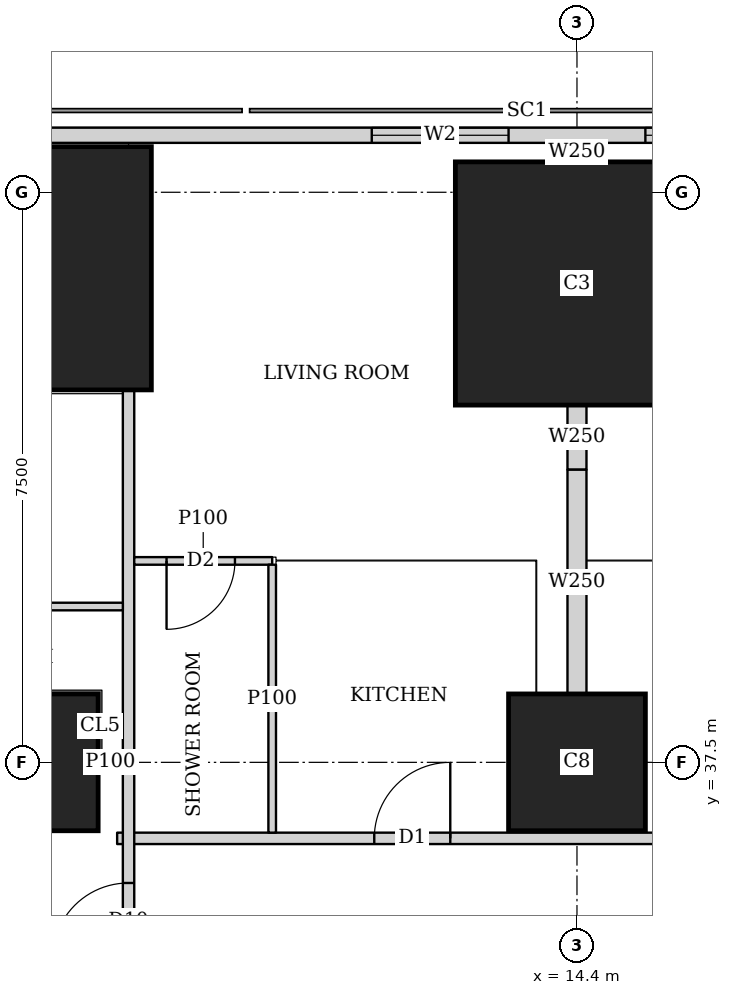
"""IFC4 building model, lengths in metres.
Left out: names, types, materials, properties, quantities, classifications, styles, units other than length and angle.
Written with IfcOpenShell. Run it as: python <this file> out.ifc"""

import sys

from ifc_helpers import new_model, si_unit, direction, frame, frame_2d, origin, origin_2d, place, context, subcontext, project, spatial, rectangle, extrude, element, fill, save


model = new_model("IFC4")
c1 = context("Model", 3, precision=1e-05, world=origin(), true_north=direction((0.0, 1.0)))
c2 = subcontext(c1, "Body", "Model", "MODEL_VIEW")
j1 = project(units=[si_unit("LENGTHUNIT", "METRE"), si_unit("PLANEANGLEUNIT", "RADIAN")], contexts=[c1])
p1 = place(None, origin())
s1 = spatial("IfcSite", under=j1, at=p1, CompositionType="ELEMENT")
p2 = place(p1, origin())
s2 = spatial("IfcBuilding", under=s1, at=p2, CompositionType="ELEMENT")
p3 = place(p2, frame((0.0, 0.0, 23.75)))
s3 = spatial("IfcBuildingStorey", under=s2, at=p3, CompositionType="ELEMENT", Elevation=23.75)
for number, where, z_axis, x_axis in (
    (1, (7.2, 37.5, 0.0), (0.0, 0.0, 1.0), (1.0, 0.0, 0.0)),
    (2, (14.4, 37.5, 0.0), (0.0, 0.0, 1.0), (1.0, 0.0, 0.0)),
):
    element("IfcColumn", number, at=place(p3, frame(where, z_axis=z_axis, x_axis=x_axis)), inside=s3, PredefinedType="COLUMN", context=c2, shape_type="SweptSolid", body=[
        extrude(rectangle(XDim=1.8, YDim=1.8, at=origin_2d()), origin(), (0.0, 0.0, 1.0), 3.75),
    ])
for number, where, z_axis, x_axis in (
    (3, (7.2, 44.0, 0.0), (0.0, 0.0, 1.0), (1.0, 0.0, 0.0)),
    (4, (14.4, 43.8, 0.0), (0.0, 0.0, 1.0), (1.0, 0.0, 0.0)),
):
    element("IfcColumn", number, at=place(p3, frame(where, z_axis=z_axis, x_axis=x_axis)), inside=s3, PredefinedType="COLUMN", context=c2, shape_type="SweptSolid", body=[
        extrude(rectangle(XDim=3.2, YDim=3.2, at=origin_2d()), origin(), (0.0, 0.0, 1.0), 3.75),
    ])
p4 = place(p3, frame((40.106, 45.75, 0.0), z_axis=(0.0, 0.0, 1.0), x_axis=(-1.0, 0.0, 0.0)))
e5 = element("IfcWall", 5, at=p4, inside=s3, PredefinedType="SOLIDWALL", context=c2, shape_type="SweptSolid", body=[
    extrude(rectangle(XDim=37.943, YDim=0.2, at=frame_2d((18.971, 0.0))), origin(), (0.0, 0.0, 1.0), 3.5),
])
p5 = place(p4, frame((8.606, 0.0, 0.9)))
e6 = element("IfcOpeningElement", 6, at=p5, cuts=e5, PredefinedType="OPENING", context=c2, shape_type="SweptSolid", body=[
    extrude(rectangle(XDim=1.8, YDim=1.5, at=frame_2d((0.9, 0.75))), frame((0.0, 0.11, 0.0), z_axis=(0.0, -1.0, 0.0), x_axis=(1.0, 0.0, 0.0)), (0.0, 0.0, 1.0), 0.22),
])
p6 = place(p4, frame((12.206, 0.0, 0.9)))
e7 = element("IfcOpeningElement", 7, at=p6, cuts=e5, PredefinedType="OPENING", context=c2, shape_type="SweptSolid", body=[
    extrude(rectangle(XDim=1.8, YDim=1.5, at=frame_2d((0.9, 0.75))), frame((0.0, 0.11, 0.0), z_axis=(0.0, -1.0, 0.0), x_axis=(1.0, 0.0, 0.0)), (0.0, 0.0, 1.0), 0.22),
])
p7 = place(p4, frame((15.806, 0.0, 0.9)))
e8 = element("IfcOpeningElement", 8, at=p7, cuts=e5, PredefinedType="OPENING", context=c2, shape_type="SweptSolid", body=[
    extrude(rectangle(XDim=1.8, YDim=1.5, at=frame_2d((0.9, 0.75))), frame((0.0, 0.11, 0.0), z_axis=(0.0, -1.0, 0.0), x_axis=(1.0, 0.0, 0.0)), (0.0, 0.0, 1.0), 0.22),
])
p8 = place(p4, frame((19.406, 0.0, 0.9)))
e9 = element("IfcOpeningElement", 9, at=p8, cuts=e5, PredefinedType="OPENING", context=c2, shape_type="SweptSolid", body=[
    extrude(rectangle(XDim=1.8, YDim=1.5, at=frame_2d((0.9, 0.75))), frame((0.0, 0.11, 0.0), z_axis=(0.0, -1.0, 0.0), x_axis=(1.0, 0.0, 0.0)), (0.0, 0.0, 1.0), 0.22),
])
p9 = place(p4, frame((23.006, 0.0, 0.9)))
e10 = element("IfcOpeningElement", 10, at=p9, cuts=e5, PredefinedType="OPENING", context=c2, shape_type="SweptSolid", body=[
    extrude(rectangle(XDim=1.8, YDim=1.5, at=frame_2d((0.9, 0.75))), frame((0.0, 0.11, 0.0), z_axis=(0.0, -1.0, 0.0), x_axis=(1.0, 0.0, 0.0)), (0.0, 0.0, 1.0), 0.22),
])
p10 = place(p4, frame((26.606, 0.0, 0.9)))
e11 = element("IfcOpeningElement", 11, at=p10, cuts=e5, PredefinedType="OPENING", context=c2, shape_type="SweptSolid", body=[
    extrude(rectangle(XDim=1.8, YDim=1.5, at=frame_2d((0.9, 0.75))), frame((0.0, 0.11, 0.0), z_axis=(0.0, -1.0, 0.0), x_axis=(1.0, 0.0, 0.0)), (0.0, 0.0, 1.0), 0.22),
])
p11 = place(p3, frame((8.5, 2.626, 0.0), z_axis=(0.0, 0.0, 1.0), x_axis=(0.0, 1.0, 0.0)))
e12 = element("IfcWall", 12, at=p11, inside=s3, PredefinedType="SOLIDWALL", context=c2, shape_type="SweptSolid", body=[
    extrude(rectangle(XDim=39.773, YDim=0.15, at=frame_2d((19.886, 0.0))), origin(), (0.0, 0.0, 1.0), 2.05),
])
p12 = place(p11, frame((9.786, 0.0, 0.0)))
e13 = element("IfcOpeningElement", 13, at=p12, cuts=e12, PredefinedType="OPENING", context=c2, shape_type="SweptSolid", body=[
    extrude(rectangle(XDim=1.0, YDim=2.0, at=frame_2d((0.5, 1.0))), frame((0.0, 0.085, 0.0), z_axis=(0.0, -1.0, 0.0), x_axis=(1.0, 0.0, 0.0)), (0.0, 0.0, 1.0), 0.17),
])
p13 = place(p11, frame((13.961, 0.0, 0.0)))
e14 = element("IfcOpeningElement", 14, at=p13, cuts=e12, PredefinedType="OPENING", context=c2, shape_type="SweptSolid", body=[
    extrude(rectangle(XDim=1.0, YDim=2.0, at=frame_2d((0.5, 1.0))), frame((0.0, 0.085, 0.0), z_axis=(0.0, -1.0, 0.0), x_axis=(1.0, 0.0, 0.0)), (0.0, 0.0, 1.0), 0.17),
])
p14 = place(p11, frame((24.787, 0.0, 0.0)))
e15 = element("IfcOpeningElement", 15, at=p14, cuts=e12, PredefinedType="OPENING", context=c2, shape_type="SweptSolid", body=[
    extrude(rectangle(XDim=1.0, YDim=2.0, at=frame_2d((0.5, 1.0))), frame((0.0, 0.085, 0.0), z_axis=(0.0, -1.0, 0.0), x_axis=(1.0, 0.0, 0.0)), (0.0, 0.0, 1.0), 0.17),
])
p15 = place(p11, frame((32.287, 0.0, 0.0)))
e16 = element("IfcOpeningElement", 16, at=p15, cuts=e12, PredefinedType="OPENING", context=c2, shape_type="SweptSolid", body=[
    extrude(rectangle(XDim=1.0, YDim=2.0, at=frame_2d((0.5, 1.0))), frame((0.0, 0.085, 0.0), z_axis=(0.0, -1.0, 0.0), x_axis=(1.0, 0.0, 0.0)), (0.0, 0.0, 1.0), 0.17),
])
p16 = place(p3, frame((8.35, 36.5, 0.0), z_axis=(0.0, 0.0, 1.0), x_axis=(1.0, 0.0, 0.0)))
e17 = element("IfcWall", 17, at=p16, inside=s3, PredefinedType="SOLIDWALL", context=c2, shape_type="SweptSolid", body=[
    extrude(rectangle(XDim=26.415, YDim=0.15, at=frame_2d((13.208, 0.0))), origin(), (0.0, 0.0, 1.0), 3.5),
])
p17 = place(p16, frame((3.383, 0.0, 0.0)))
e18 = element("IfcOpeningElement", 18, at=p17, cuts=e17, PredefinedType="OPENING", context=c2, shape_type="SweptSolid", body=[
    extrude(rectangle(XDim=1.0, YDim=2.1, at=frame_2d((0.5, 1.05))), frame((0.0, 0.085, 0.0), z_axis=(0.0, -1.0, 0.0), x_axis=(1.0, 0.0, 0.0)), (0.0, 0.0, 1.0), 0.17),
])
p18 = place(p16, frame((7.65, 0.0, 0.0)))
e19 = element("IfcOpeningElement", 19, at=p18, cuts=e17, PredefinedType="OPENING", context=c2, shape_type="SweptSolid", body=[
    extrude(rectangle(XDim=1.0, YDim=2.1, at=frame_2d((0.5, 1.05))), frame((0.0, 0.085, 0.0), z_axis=(0.0, -1.0, 0.0), x_axis=(1.0, 0.0, 0.0)), (0.0, 0.0, 1.0), 0.17),
])
p19 = place(p16, frame((14.857, 0.0, 0.0)))
e20 = element("IfcOpeningElement", 20, at=p19, cuts=e17, PredefinedType="OPENING", context=c2, shape_type="SweptSolid", body=[
    extrude(rectangle(XDim=1.0, YDim=2.1, at=frame_2d((0.5, 1.05))), frame((0.0, 0.085, 0.0), z_axis=(0.0, -1.0, 0.0), x_axis=(1.0, 0.0, 0.0)), (0.0, 0.0, 1.0), 0.17),
])
p20 = place(p3, frame((8.101, 37.5, 0.0), z_axis=(0.0, 0.0, 1.0), x_axis=(1.0, 0.0, 0.0)))
e21 = element("IfcWall", 21, at=p20, inside=s3, PredefinedType="PARTITIONING", context=c2, shape_type="SweptSolid", body=[
    extrude(rectangle(XDim=0.324, YDim=0.1, at=frame_2d((0.162, 0.0))), origin(), (0.0, 0.0, 1.0), 3.5),
])
p21 = place(p3, frame((4.9, 39.55, 0.0), z_axis=(0.0, 0.0, 1.0), x_axis=(1.0, 0.0, 0.0)))
e22 = element("IfcWall", 22, at=p21, inside=s3, PredefinedType="PARTITIONING", context=c2, shape_type="SweptSolid", body=[
    extrude(rectangle(XDim=3.525, YDim=0.1, at=frame_2d((1.763, 0.0))), origin(), (0.0, 0.0, 1.0), 3.5),
])
p22 = place(p3, frame((8.575, 40.15, 0.0), z_axis=(0.0, 0.0, 1.0), x_axis=(1.0, 0.0, 0.0)))
e23 = element("IfcWall", 23, at=p22, inside=s3, PredefinedType="PARTITIONING", context=c2, shape_type="SweptSolid", body=[
    extrude(rectangle(XDim=1.815, YDim=0.1, at=frame_2d((0.907, 0.0))), origin(), (0.0, 0.0, 1.0), 3.5),
])
p23 = place(p22, frame((0.425, 0.0, 0.0)))
e24 = element("IfcOpeningElement", 24, at=p23, cuts=e23, PredefinedType="OPENING", context=c2, shape_type="SweptSolid", body=[
    extrude(rectangle(XDim=0.9, YDim=2.1, at=frame_2d((0.45, 1.05))), frame((0.0, 0.06, 0.0), z_axis=(0.0, -1.0, 0.0), x_axis=(1.0, 0.0, 0.0)), (0.0, 0.0, 1.0), 0.12),
])
p24 = place(p3, frame((10.39, 36.575, 0.0), z_axis=(0.0, 0.0, 1.0), x_axis=(0.0, 1.0, 0.0)))
e25 = element("IfcWall", 25, at=p24, inside=s3, PredefinedType="PARTITIONING", context=c2, shape_type="SweptSolid", body=[
    extrude(rectangle(XDim=3.525, YDim=0.1, at=frame_2d((1.763, 0.0))), origin(), (0.0, 0.0, 1.0), 3.5),
])
p25 = place(p3, frame((14.4, 41.35, 0.0), z_axis=(0.0, 0.0, 1.0), x_axis=(0.0, 1.0, 0.0)))
e26 = element("IfcWall", 26, at=p25, inside=s3, PredefinedType="SOLIDWALL", context=c2, shape_type="SweptSolid", body=[
    extrude(rectangle(XDim=0.849, YDim=0.25, at=frame_2d((0.424, 0.0))), origin(), (0.0, 0.0, 1.0), 2.05),
])
p26 = place(p3, frame((14.4, 45.401, 0.0), z_axis=(0.0, 0.0, 1.0), x_axis=(0.0, 1.0, 0.0)))
e27 = element("IfcWall", 27, at=p26, inside=s3, PredefinedType="SOLIDWALL", context=c2, shape_type="SweptSolid", body=[
    extrude(rectangle(XDim=0.249, YDim=0.25, at=frame_2d((0.125, 0.0))), origin(), (0.0, 0.0, 1.0), 2.05),
])
p27 = place(p3, frame((14.4, 38.401, 0.0), z_axis=(0.0, 0.0, 1.0), x_axis=(0.0, 1.0, 0.0)))
e28 = element("IfcWall", 28, at=p27, inside=s3, PredefinedType="SOLIDWALL", context=c2, shape_type="SweptSolid", body=[
    extrude(rectangle(XDim=2.949, YDim=0.25, at=frame_2d((1.475, 0.0))), origin(), (0.0, 0.0, 1.0), 3.5),
])
p28 = place(p9, origin())
e29 = element("IfcWindow", 29, at=p28, inside=s3, PartitioningType="SINGLE_PANEL", PredefinedType="WINDOW", context=c2, shape_type="SweptSolid", body=[
    extrude(rectangle(XDim=1.8, YDim=1.5, at=frame_2d((0.9, 0.75))), frame((0.0, 0.03, 0.0), z_axis=(0.0, -1.0, 0.0), x_axis=(1.0, 0.0, 0.0)), (0.0, 0.0, 1.0), 0.06),
])
fill(e10, e29)
p29 = place(p10, origin())
e30 = element("IfcWindow", 30, at=p29, inside=s3, PartitioningType="SINGLE_PANEL", PredefinedType="WINDOW", context=c2, shape_type="SweptSolid", body=[
    extrude(rectangle(XDim=1.8, YDim=1.5, at=frame_2d((0.9, 0.75))), frame((0.0, 0.03, 0.0), z_axis=(0.0, -1.0, 0.0), x_axis=(1.0, 0.0, 0.0)), (0.0, 0.0, 1.0), 0.06),
])
fill(e11, e30)
p30 = place(p15, origin())
e31 = element("IfcDoor", 31, at=p30, inside=s3, OperationType="SINGLE_SWING_LEFT", PredefinedType="DOOR", context=c2, shape_type="SweptSolid", body=[
    extrude(rectangle(XDim=1.0, YDim=2.0, at=frame_2d((0.5, 1.0))), frame((0.0, 0.025, 0.0), z_axis=(0.0, -1.0, 0.0), x_axis=(1.0, 0.0, 0.0)), (0.0, 0.0, 1.0), 0.05),
])
fill(e16, e31)
p31 = place(p23, origin())
e32 = element("IfcDoor", 32, at=p31, inside=s3, OperationType="SINGLE_SWING_RIGHT", PredefinedType="DOOR", context=c2, shape_type="SweptSolid", body=[
    extrude(rectangle(XDim=0.9, YDim=2.1, at=frame_2d((0.45, 1.05))), frame((0.0, 0.025, 0.0), z_axis=(0.0, -1.0, 0.0), x_axis=(1.0, 0.0, 0.0)), (0.0, 0.0, 1.0), 0.05),
])
fill(e24, e32)
p32 = place(p17, origin())
e33 = element("IfcDoor", 33, at=p32, inside=s3, OperationType="SINGLE_SWING_RIGHT", PredefinedType="DOOR", context=c2, shape_type="SweptSolid", body=[
    extrude(rectangle(XDim=1.0, YDim=2.1, at=frame_2d((0.5, 1.05))), frame((0.0, 0.025, 0.0), z_axis=(0.0, -1.0, 0.0), x_axis=(1.0, 0.0, 0.0)), (0.0, 0.0, 1.0), 0.05),
])
fill(e18, e33)
save(model, sys.argv[1])
